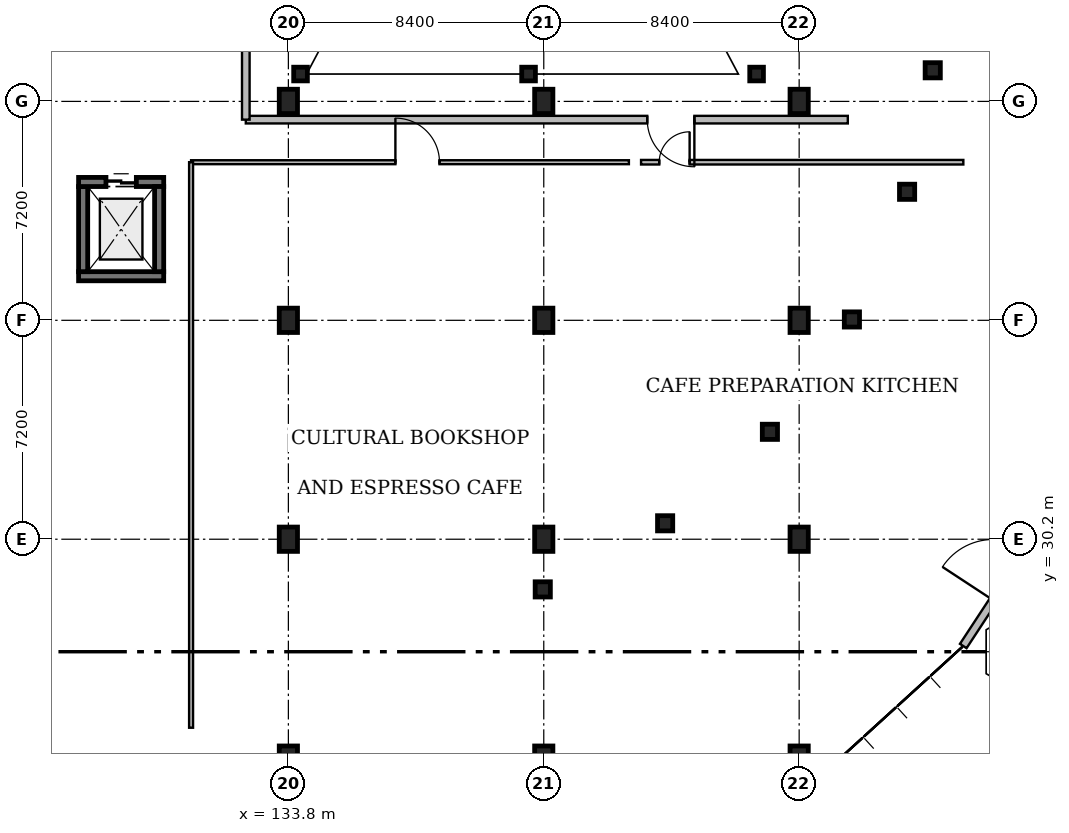
"""IFC4 building model, lengths in metres.
Left out: names, types, materials, properties, quantities, classifications, styles, units other than length and angle.
Written with IfcOpenShell. Run it as: python <this file> out.ifc"""

import sys

from ifc_helpers import new_model, si_unit, direction, frame, frame_2d, origin, origin_2d, place, context, subcontext, project, spatial, rectangle, extrude, element, fill, save


model = new_model("IFC4")
c1 = context("Model", 3, precision=1e-05, world=origin(), true_north=direction((0.0, 1.0)))
c2 = subcontext(c1, "Body", "Model", "MODEL_VIEW")
j1 = project(units=[si_unit("LENGTHUNIT", "METRE"), si_unit("PLANEANGLEUNIT", "RADIAN")], contexts=[c1])
p1 = place(None, origin())
s1 = spatial("IfcSite", under=j1, at=p1, CompositionType="ELEMENT")
p2 = place(p1, origin())
s2 = spatial("IfcBuilding", under=s1, at=p2, CompositionType="ELEMENT")
p3 = place(p2, origin())
s3 = spatial("IfcBuildingStorey", under=s2, at=p3, CompositionType="ELEMENT", Elevation=0.0)
for number, where, z_axis, x_axis in (
    (1, (133.8, 23.0, 0.0), (0.0, 0.0, 1.0), (1.0, 0.0, 0.0)),
    (2, (133.8, 30.2, 0.0), (0.0, 0.0, 1.0), (1.0, 0.0, 0.0)),
    (3, (133.8, 37.4, 0.0), (0.0, 0.0, 1.0), (1.0, 0.0, 0.0)),
    (4, (133.8, 44.6, 0.0), (0.0, 0.0, 1.0), (1.0, 0.0, 0.0)),
    (5, (142.2, 23.0, 0.0), (0.0, 0.0, 1.0), (1.0, 0.0, 0.0)),
    (6, (142.2, 30.2, 0.0), (0.0, 0.0, 1.0), (1.0, 0.0, 0.0)),
    (7, (142.2, 37.4, 0.0), (0.0, 0.0, 1.0), (1.0, 0.0, 0.0)),
    (8, (142.2, 44.6, 0.0), (0.0, 0.0, 1.0), (1.0, 0.0, 0.0)),
    (9, (150.6, 23.0, 0.0), (0.0, 0.0, 1.0), (1.0, 0.0, 0.0)),
    (10, (150.6, 30.2, 0.0), (0.0, 0.0, 1.0), (1.0, 0.0, 0.0)),
    (11, (150.6, 37.4, 0.0), (0.0, 0.0, 1.0), (1.0, 0.0, 0.0)),
    (12, (150.6, 44.6, 0.0), (0.0, 0.0, 1.0), (1.0, 0.0, 0.0)),
):
    element("IfcColumn", number, at=place(p3, frame(where, z_axis=z_axis, x_axis=x_axis)), inside=s3, PredefinedType="COLUMN", context=c2, shape_type="SweptSolid", body=[
        extrude(rectangle(XDim=0.6, YDim=0.8, at=origin_2d()), origin(), (0.0, 0.0, 1.0), 4.8),
    ])
for number, where, z_axis, x_axis in (
    (13, (134.2, 45.5, 0.0), (0.0, 0.0, 1.0), (1.0, 0.0, 0.0)),
    (14, (141.7, 45.5, 0.0), (0.0, 0.0, 1.0), (1.0, 0.0, 0.0)),
    (15, (149.2, 45.5, 0.0), (0.0, 0.0, 1.0), (1.0, 0.0, 0.0)),
):
    element("IfcColumn", number, at=place(p3, frame(where, z_axis=z_axis, x_axis=x_axis)), inside=s3, PredefinedType="COLUMN", context=c2, shape_type="SweptSolid", body=[
        extrude(rectangle(XDim=0.45, YDim=0.45, at=origin_2d()), origin(), (0.0, 0.0, 1.0), 0.7),
    ])
for number, where, z_axis, x_axis in (
    (16, (154.993, 45.623, 0.0), (0.0, 0.0, 1.0), (1.0, 0.0, 0.0)),
    (17, (154.15, 41.627, 0.0), (0.0, 0.0, 1.0), (1.0, 0.0, 0.0)),
    (18, (152.335, 37.428, 0.0), (0.0, 0.0, 1.0), (1.0, 0.0, 0.0)),
    (19, (149.638, 33.733, 0.0), (0.0, 0.0, 1.0), (1.0, 0.0, 0.0)),
    (20, (146.192, 30.724, 0.0), (0.0, 0.0, 1.0), (1.0, 0.0, 0.0)),
    (21, (142.167, 28.55, 0.0), (0.0, 0.0, 1.0), (1.0, 0.0, 0.0)),
):
    element("IfcColumn", number, at=place(p3, frame(where, z_axis=z_axis, x_axis=x_axis)), inside=s3, PredefinedType="COLUMN", context=c2, shape_type="SweptSolid", body=[
        extrude(rectangle(XDim=0.5, YDim=0.5, at=origin_2d()), origin(), (0.0, 0.0, 1.0), 4.8),
    ])
for number, where, z_axis, x_axis in (
    (22, (129.7, 38.85, 0.0), (0.0, 0.0, 1.0), (-1.0, 0.0, 0.0)),
    (23, (127.05, 39.0, 0.0), (0.0, 0.0, 1.0), (0.0, 1.0, 0.0)),
):
    element("IfcWall", number, at=place(p3, frame(where, z_axis=z_axis, x_axis=x_axis)), inside=s3, PredefinedType="SOLIDWALL", context=c2, shape_type="SweptSolid", body=[
        extrude(rectangle(XDim=2.8, YDim=0.3, at=frame_2d((1.4, 0.0))), origin(), (0.0, 0.0, 1.0), 4.8),
    ])
p4 = place(p3, frame((126.9, 41.95, 0.0), z_axis=(0.0, 0.0, 1.0), x_axis=(1.0, 0.0, 0.0)))
e24 = element("IfcWall", 24, at=p4, inside=s3, PredefinedType="SOLIDWALL", context=c2, shape_type="SweptSolid", body=[
    extrude(rectangle(XDim=2.8, YDim=0.3, at=frame_2d((1.4, 0.0))), origin(), (0.0, 0.0, 1.0), 4.8),
])
p5 = place(p4, frame((0.9, 0.0, 0.0)))
e25 = element("IfcOpeningElement", 25, at=p5, cuts=e24, PredefinedType="OPENING", context=c2, shape_type="SweptSolid", body=[
    extrude(rectangle(XDim=1.0, YDim=2.15, at=frame_2d((0.5, 1.075))), frame((0.0, 0.17, 0.0), z_axis=(0.0, -1.0, 0.0), x_axis=(1.0, 0.0, 0.0)), (0.0, 0.0, 1.0), 0.34),
])
p6 = place(p3, frame((129.55, 41.8, 0.0), z_axis=(0.0, 0.0, 1.0), x_axis=(0.0, -1.0, 0.0)))
e26 = element("IfcWall", 26, at=p6, inside=s3, PredefinedType="SOLIDWALL", context=c2, shape_type="SweptSolid", body=[
    extrude(rectangle(XDim=2.8, YDim=0.3, at=frame_2d((1.4, 0.0))), origin(), (0.0, 0.0, 1.0), 4.8),
])
p7 = place(p3, frame((155.998, 26.687, 0.0), z_axis=(0.0, 0.0, 1.0), x_axis=(0.548668788702, 0.836039807846, 0.0)))
e27 = element("IfcWall", 27, at=p7, inside=s3, PredefinedType="SOLIDWALL", context=c2, shape_type="SweptSolid", body=[
    extrude(rectangle(XDim=6.91, YDim=0.26, at=frame_2d((3.455, 0.0))), origin(), (0.0, 0.0, 1.0), 4.54),
])
p8 = place(p7, frame((1.8, 0.0, 0.0)))
e28 = element("IfcOpeningElement", 28, at=p8, cuts=e27, PredefinedType="OPENING", context=c2, shape_type="SweptSolid", body=[
    extrude(rectangle(XDim=2.0, YDim=2.4, at=frame_2d((1.0, 1.2))), frame((0.0, 0.15, 0.0), z_axis=(0.0, -1.0, 0.0), x_axis=(1.0, 0.0, 0.0)), (0.0, 0.0, 1.0), 0.3),
])
p9 = place(p3, frame((152.2, 44.0, 0.0), z_axis=(0.0, 0.0, 1.0), x_axis=(-1.0, 0.0, 0.0)))
e29 = element("IfcWall", 29, at=p9, inside=s3, PredefinedType="PARTITIONING", context=c2, shape_type="SweptSolid", body=[
    extrude(rectangle(XDim=19.8, YDim=0.25, at=frame_2d((9.9, 0.0))), origin(), (0.0, 0.0, 1.0), 4.54),
])
p10 = place(p9, frame((5.046, 0.0, 0.0)))
e30 = element("IfcOpeningElement", 30, at=p10, cuts=e29, PredefinedType="OPENING", context=c2, shape_type="SweptSolid", body=[
    extrude(rectangle(XDim=1.55, YDim=2.2, at=frame_2d((0.775, 1.1))), frame((0.0, 0.145, 0.0), z_axis=(0.0, -1.0, 0.0), x_axis=(1.0, 0.0, 0.0)), (0.0, 0.0, 1.0), 0.29),
])
p11 = place(p3, frame((132.4, 44.0, 0.0), z_axis=(0.0, 0.0, 1.0), x_axis=(0.0, 1.0, 0.0)))
e31 = element("IfcWall", 31, at=p11, inside=s3, PredefinedType="PARTITIONING", context=c2, shape_type="SweptSolid", body=[
    extrude(rectangle(XDim=14.2, YDim=0.25, at=frame_2d((7.1, 0.0))), origin(), (0.0, 0.0, 1.0), 4.54),
])
p12 = place(p3, frame((130.6, 42.6, 0.0), z_axis=(0.0, 0.0, 1.0), x_axis=(1.0, 0.0, 0.0)))
e32 = element("IfcWall", 32, at=p12, inside=s3, PredefinedType="PARTITIONING", context=c2, shape_type="SweptSolid", body=[
    extrude(rectangle(XDim=14.4, YDim=0.13, at=frame_2d((7.2, 0.0))), origin(), (0.0, 0.0, 1.0), 4.54),
])
p13 = place(p12, frame((6.72, 0.0, 0.0)))
e33 = element("IfcOpeningElement", 33, at=p13, cuts=e32, PredefinedType="OPENING", context=c2, shape_type="SweptSolid", body=[
    extrude(rectangle(XDim=1.45, YDim=2.2, at=frame_2d((0.725, 1.1))), frame((0.0, 0.085, 0.0), z_axis=(0.0, -1.0, 0.0), x_axis=(1.0, 0.0, 0.0)), (0.0, 0.0, 1.0), 0.17),
])
p14 = place(p3, frame((130.6, 24.0, 0.0), z_axis=(0.0, 0.0, 1.0), x_axis=(0.0, 1.0, 0.0)))
e34 = element("IfcWall", 34, at=p14, inside=s3, PredefinedType="PARTITIONING", context=c2, shape_type="SweptSolid", body=[
    extrude(rectangle(XDim=18.6, YDim=0.13, at=frame_2d((9.3, 0.0))), origin(), (0.0, 0.0, 1.0), 4.54),
])
p15 = place(p3, frame((145.4, 42.6, 0.0), z_axis=(0.0, 0.0, 1.0), x_axis=(1.0, 0.0, 0.0)))
e35 = element("IfcWall", 35, at=p15, inside=s3, PredefinedType="PARTITIONING", context=c2, shape_type="SweptSolid", body=[
    extrude(rectangle(XDim=10.6, YDim=0.15, at=frame_2d((5.3, 0.0))), origin(), (0.0, 0.0, 1.0), 4.54),
])
p16 = place(p15, frame((0.597, 0.0, 0.0)))
e36 = element("IfcOpeningElement", 36, at=p16, cuts=e35, PredefinedType="OPENING", context=c2, shape_type="SweptSolid", body=[
    extrude(rectangle(XDim=1.0, YDim=2.1, at=frame_2d((0.5, 1.05))), frame((0.0, 0.095, 0.0), z_axis=(0.0, -1.0, 0.0), x_axis=(1.0, 0.0, 0.0)), (0.0, 0.0, 1.0), 0.19),
])
p17 = place(p5, origin())
e37 = element("IfcDoor", 37, at=p17, inside=s3, OperationType="DOUBLE_DOOR_SLIDING", PredefinedType="DOOR", context=c2, shape_type="SweptSolid", body=[
    extrude(rectangle(XDim=1.0, YDim=2.15, at=frame_2d((0.5, 1.075))), frame((0.0, 0.025, 0.0), z_axis=(0.0, -1.0, 0.0), x_axis=(1.0, 0.0, 0.0)), (0.0, 0.0, 1.0), 0.05),
])
fill(e25, e37)
p18 = place(p10, origin())
e38 = element("IfcDoor", 38, at=p18, inside=s3, OperationType="DOUBLE_DOOR_SINGLE_SWING", PredefinedType="DOOR", context=c2, shape_type="SweptSolid", body=[
    extrude(rectangle(XDim=1.55, YDim=2.2, at=frame_2d((0.775, 1.1))), frame((0.0, 0.025, 0.0), z_axis=(0.0, -1.0, 0.0), x_axis=(1.0, 0.0, 0.0)), (0.0, 0.0, 1.0), 0.05),
])
fill(e30, e38)
p19 = place(p13, origin())
e39 = element("IfcDoor", 39, at=p19, inside=s3, OperationType="DOUBLE_DOOR_SINGLE_SWING", PredefinedType="DOOR", context=c2, shape_type="SweptSolid", body=[
    extrude(rectangle(XDim=1.45, YDim=2.2, at=frame_2d((0.725, 1.1))), frame((0.0, 0.025, 0.0), z_axis=(0.0, -1.0, 0.0), x_axis=(1.0, 0.0, 0.0)), (0.0, 0.0, 1.0), 0.05),
])
fill(e33, e39)
p20 = place(p16, origin())
e40 = element("IfcDoor", 40, at=p20, inside=s3, OperationType="SINGLE_SWING_RIGHT", PredefinedType="DOOR", context=c2, shape_type="SweptSolid", body=[
    extrude(rectangle(XDim=1.0, YDim=2.1, at=frame_2d((0.5, 1.05))), frame((0.0, 0.025, 0.0), z_axis=(0.0, -1.0, 0.0), x_axis=(1.0, 0.0, 0.0)), (0.0, 0.0, 1.0), 0.05),
])
fill(e36, e40)
save(model, sys.argv[1])
